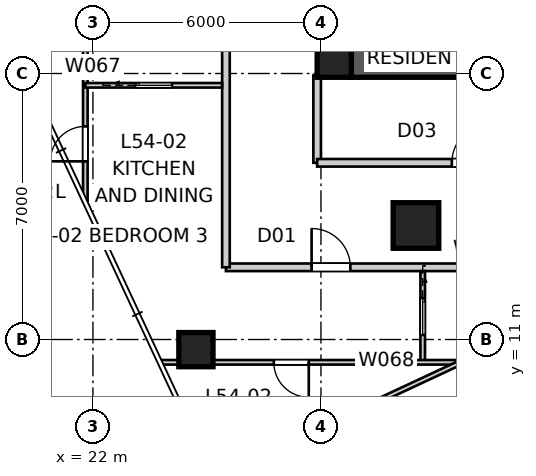
"""IFC4 building model, lengths in metres.
Left out: names, types, materials, properties, quantities, classifications, styles, units other than length and angle.
Written with IfcOpenShell. Run it as: python <this file> out.ifc"""

import sys

from ifc_helpers import new_model, si_unit, direction, frame, frame_2d, origin, origin_2d, place, context, subcontext, project, spatial, polyline, rectangle, outline, extrude, element, fill, save


model = new_model("IFC4")
c1 = context("Model", 3, precision=1e-05, world=origin(), true_north=direction((0.0, 1.0)))
c2 = subcontext(c1, "Body", "Model", "MODEL_VIEW")
j1 = project(units=[si_unit("LENGTHUNIT", "METRE"), si_unit("PLANEANGLEUNIT", "RADIAN")], contexts=[c1])
p1 = place(None, origin())
s1 = spatial("IfcSite", under=j1, at=p1, CompositionType="ELEMENT")
p2 = place(p1, origin())
s2 = spatial("IfcBuilding", under=s1, at=p2, CompositionType="ELEMENT")
p3 = place(p2, frame((0.0, 0.0, 196.4)))
s3 = spatial("IfcBuildingStorey", under=s2, at=p3, CompositionType="ELEMENT", Elevation=196.4)
p4 = place(p3, frame((51.2, 18.35, 0.0), z_axis=(0.0, 0.0, 1.0), x_axis=(-1.0, 0.0, 0.0)))
e1 = element("IfcWall", 1, at=p4, inside=s3, PredefinedType="SHEAR", context=c2, shape_type="SweptSolid", body=[
    extrude(outline(polyline([(0.0, -0.45), (22.4, -0.45), (22.4, -0.025), (22.85, -0.025), (22.85, 0.025), (22.4, 0.025), (22.4, 0.45), (0.0, 0.45), (0.0, 0.025), (-0.45, 0.025), (-0.45, -0.025), (0.0, -0.025), (0.0, -0.45)])), origin(), (0.0, 0.0, 1.0), 3.4),
])
p5 = place(p3, frame((28.35, 41.2, 0.0), z_axis=(0.0, 0.0, 1.0), x_axis=(0.0, -1.0, 0.0)))
e2 = element("IfcWall", 2, at=p5, inside=s3, PredefinedType="SHEAR", context=c2, shape_type="SweptSolid", body=[
    extrude(outline(polyline([(0.0, -0.45), (22.4, -0.45), (22.4, -0.025), (22.85, -0.025), (22.85, 0.025), (22.4, 0.025), (22.4, 0.45), (0.0, 0.45), (0.0, 0.025), (-0.45, 0.025), (-0.45, -0.025), (0.0, -0.025), (0.0, -0.45)])), origin(), (0.0, 0.0, 1.0), 3.4),
])
p6 = place(p5, frame((11.14, 0.0, 0.0)))
e3 = element("IfcOpeningElement", 3, at=p6, cuts=e2, PredefinedType="OPENING", context=c2, shape_type="SweptSolid", body=[
    extrude(rectangle(XDim=1.02, YDim=2.4, at=frame_2d((0.51, 1.2))), frame((0.0, 0.46, 0.0), z_axis=(0.0, -1.0, 0.0), x_axis=(1.0, 0.0, 0.0)), (0.0, 0.0, 1.0), 0.92),
])
for number, where, z_axis, x_axis in (
    (4, (28.35, 18.35, 0.0), (0.0, 0.0, 1.0), (1.0, 0.0, 0.0)),
    (5, (24.71, 10.733, 0.0), (0.0, 0.0, 1.0), (1.0, 0.0, 0.0)),
):
    element("IfcColumn", number, at=place(p3, frame(where, z_axis=z_axis, x_axis=x_axis)), inside=s3, PredefinedType="COLUMN", context=c2, shape_type="SweptSolid", body=[
        extrude(rectangle(XDim=0.9, YDim=0.9, at=origin_2d()), origin(), (0.0, 0.0, 1.0), 3.4),
    ])
p7 = place(p3, frame((30.5, 14.0, 0.0), z_axis=(0.0, 0.0, 1.0), x_axis=(1.0, 0.0, 0.0)))
e6 = element("IfcColumn", 6, at=p7, inside=s3, PredefinedType="COLUMN", context=c2, shape_type="SweptSolid", body=[
    extrude(rectangle(XDim=1.2, YDim=1.2, at=origin_2d()), origin(), (0.0, 0.0, 1.0), 3.4),
])
p8 = place(p3, frame((25.5, 12.9, 0.0), z_axis=(0.0, 0.0, 1.0), x_axis=(1.0, 0.0, 0.0)))
e7 = element("IfcWall", 7, at=p8, inside=s3, PredefinedType="PARTITIONING", context=c2, shape_type="SweptSolid", body=[
    extrude(rectangle(XDim=8.192, YDim=0.2, at=frame_2d((4.096, 0.0))), origin(), (0.0, 0.0, 1.0), 3.25),
])
p9 = place(p8, frame((2.254, 0.0, 0.0)))
e8 = element("IfcOpeningElement", 8, at=p9, cuts=e7, PredefinedType="OPENING", context=c2, shape_type="SweptSolid", body=[
    extrude(rectangle(XDim=1.02, YDim=2.34, at=frame_2d((0.51, 1.17))), frame((0.0, 0.11, 0.0), z_axis=(0.0, -1.0, 0.0), x_axis=(1.0, 0.0, 0.0)), (0.0, 0.0, 1.0), 0.22),
])
p10 = place(p3, frame((25.5, 46.7, 0.0), z_axis=(0.0, 0.0, 1.0), x_axis=(0.0, -1.0, 0.0)))
e9 = element("IfcWall", 9, at=p10, inside=s3, PredefinedType="PARTITIONING", context=c2, shape_type="SweptSolid", body=[
    extrude(rectangle(XDim=33.8, YDim=0.2, at=frame_2d((16.9, 0.0))), origin(), (0.0, 0.0, 1.0), 3.25),
])
p11 = place(p10, frame((15.349, 0.0, 0.0)))
e10 = element("IfcOpeningElement", 10, at=p11, cuts=e9, PredefinedType="OPENING", context=c2, shape_type="SweptSolid", body=[
    extrude(rectangle(XDim=1.02, YDim=2.34, at=frame_2d((0.51, 1.17))), frame((0.0, 0.11, 0.0), z_axis=(0.0, -1.0, 0.0), x_axis=(1.0, 0.0, 0.0)), (0.0, 0.0, 1.0), 0.22),
])
p12 = place(p3, frame((27.9, 17.95, 0.0), z_axis=(0.0, 0.0, 1.0), x_axis=(0.0, -1.0, 0.0)))
e11 = element("IfcWall", 11, at=p12, inside=s3, PredefinedType="PARTITIONING", context=c2, shape_type="SweptSolid", body=[
    extrude(rectangle(XDim=2.3, YDim=0.2, at=frame_2d((1.15, 0.0))), origin(), (0.0, 0.0, 1.0), 3.25),
])
p13 = place(p3, frame((27.9, 15.65, 0.0), z_axis=(0.0, 0.0, 1.0), x_axis=(1.0, 0.0, 0.0)))
e12 = element("IfcWall", 12, at=p13, inside=s3, PredefinedType="PARTITIONING", context=c2, shape_type="SweptSolid", body=[
    extrude(rectangle(XDim=24.2, YDim=0.2, at=frame_2d((12.1, 0.0))), origin(), (0.0, 0.0, 1.0), 3.25),
])
p14 = place(p13, frame((12.437, 0.0, 0.0)))
e13 = element("IfcOpeningElement", 13, at=p14, cuts=e12, PredefinedType="OPENING", context=c2, shape_type="SweptSolid", body=[
    extrude(rectangle(XDim=1.02, YDim=2.1, at=frame_2d((0.51, 1.05))), frame((0.0, 0.11, 0.0), z_axis=(0.0, -1.0, 0.0), x_axis=(1.0, 0.0, 0.0)), (0.0, 0.0, 1.0), 0.22),
])
p15 = place(p13, frame((3.544, 0.0, 0.0)))
e14 = element("IfcOpeningElement", 14, at=p15, cuts=e12, PredefinedType="OPENING", context=c2, shape_type="SweptSolid", body=[
    extrude(rectangle(XDim=1.02, YDim=2.1, at=frame_2d((0.51, 1.05))), frame((0.0, 0.11, 0.0), z_axis=(0.0, -1.0, 0.0), x_axis=(1.0, 0.0, 0.0)), (0.0, 0.0, 1.0), 0.22),
])
p16 = place(p13, frame((19.883, 0.0, 0.0)))
e15 = element("IfcOpeningElement", 15, at=p16, cuts=e12, PredefinedType="OPENING", context=c2, shape_type="SweptSolid", body=[
    extrude(rectangle(XDim=1.02, YDim=2.1, at=frame_2d((0.51, 1.05))), frame((0.0, 0.11, 0.0), z_axis=(0.0, -1.0, 0.0), x_axis=(1.0, 0.0, 0.0)), (0.0, 0.0, 1.0), 0.22),
])
p17 = place(p3, frame((21.8, 14.647, 0.0), z_axis=(0.0, 0.0, 1.0), x_axis=(0.0, 1.0, 0.0)))
e16 = element("IfcWall", 16, at=p17, inside=s3, PredefinedType="PARTITIONING", context=c2, shape_type="SweptSolid", body=[
    extrude(rectangle(XDim=32.199, YDim=0.12, at=frame_2d((16.1, 0.0))), origin(), (0.0, 0.0, 1.0), 3.25),
])
p18 = place(p17, frame((29.231, 0.0, 0.0)))
e17 = element("IfcOpeningElement", 17, at=p18, cuts=e16, PredefinedType="OPENING", context=c2, shape_type="SweptSolid", body=[
    extrude(rectangle(XDim=0.92, YDim=2.34, at=frame_2d((0.46, 1.17))), frame((0.0, 0.07, 0.0), z_axis=(0.0, -1.0, 0.0), x_axis=(1.0, 0.0, 0.0)), (0.0, 0.0, 1.0), 0.14),
])
p19 = place(p17, frame((14.835, 0.0, 0.0)))
e18 = element("IfcOpeningElement", 18, at=p19, cuts=e16, PredefinedType="OPENING", context=c2, shape_type="SweptSolid", body=[
    extrude(rectangle(XDim=0.92, YDim=2.34, at=frame_2d((0.46, 1.17))), frame((0.0, 0.07, 0.0), z_axis=(0.0, -1.0, 0.0), x_axis=(1.0, 0.0, 0.0)), (0.0, 0.0, 1.0), 0.14),
])
p20 = place(p17, frame((1.041, 0.0, 0.0)))
e19 = element("IfcOpeningElement", 19, at=p20, cuts=e16, PredefinedType="OPENING", context=c2, shape_type="SweptSolid", body=[
    extrude(rectangle(XDim=0.92, YDim=2.1, at=frame_2d((0.46, 1.05))), frame((0.0, 0.07, 0.0), z_axis=(0.0, -1.0, 0.0), x_axis=(1.0, 0.0, 0.0)), (0.0, 0.0, 1.0), 0.14),
])
p21 = place(p17, frame((19.971, 0.0, 0.0)))
e20 = element("IfcOpeningElement", 20, at=p21, cuts=e16, PredefinedType="OPENING", context=c2, shape_type="SweptSolid", body=[
    extrude(rectangle(XDim=0.96, YDim=2.1, at=frame_2d((0.48, 1.05))), frame((0.0, 0.07, 0.0), z_axis=(0.0, -1.0, 0.0), x_axis=(1.0, 0.0, 0.0)), (0.0, 0.0, 1.0), 0.14),
])
p22 = place(p3, frame((21.8, 17.69, 0.0), z_axis=(0.0, 0.0, 1.0), x_axis=(1.0, 0.0, 0.0)))
e21 = element("IfcWall", 21, at=p22, inside=s3, PredefinedType="PARTITIONING", context=c2, shape_type="SweptSolid", body=[
    extrude(rectangle(XDim=3.6, YDim=0.12, at=frame_2d((1.8, 0.0))), origin(), (0.0, 0.0, 1.0), 3.25),
])
p23 = place(p22, frame((1.32, 0.0, 0.0)))
e22 = element("IfcOpeningElement", 22, at=p23, cuts=e21, PredefinedType="OPENING", context=c2, shape_type="SweptSolid", body=[
    extrude(rectangle(XDim=0.96, YDim=2.1, at=frame_2d((0.48, 1.05))), frame((0.0, 0.07, 0.0), z_axis=(0.0, -1.0, 0.0), x_axis=(1.0, 0.0, 0.0)), (0.0, 0.0, 1.0), 0.14),
])
p24 = place(p3, frame((30.677, 12.8, 0.0), z_axis=(0.0, 0.0, 1.0), x_axis=(0.0, -1.0, 0.0)))
e23 = element("IfcWall", 23, at=p24, inside=s3, PredefinedType="PARTITIONING", context=c2, shape_type="SweptSolid", body=[
    extrude(rectangle(XDim=2.4, YDim=0.12, at=frame_2d((1.2, 0.0))), origin(), (0.0, 0.0, 1.0), 3.25),
])
p25 = place(p24, frame((0.72, 0.0, 0.0)))
e24 = element("IfcOpeningElement", 24, at=p25, cuts=e23, PredefinedType="OPENING", context=c2, shape_type="SweptSolid", body=[
    extrude(rectangle(XDim=0.96, YDim=2.1, at=frame_2d((0.48, 1.05))), frame((0.0, 0.07, 0.0), z_axis=(0.0, -1.0, 0.0), x_axis=(1.0, 0.0, 0.0)), (0.0, 0.0, 1.0), 0.14),
])
p26 = place(p3, frame((49.14, 10.4, 0.0), z_axis=(0.0, 0.0, 1.0), x_axis=(-1.0, 0.0, 0.0)))
e25 = element("IfcWall", 25, at=p26, inside=s3, PredefinedType="PARTITIONING", context=c2, shape_type="SweptSolid", body=[
    extrude(rectangle(XDim=25.333, YDim=0.12, at=frame_2d((12.667, 0.0))), origin(), (0.0, 0.0, 1.0), 3.25),
])
p27 = place(p26, frame((2.188, 0.0, 0.0)))
e26 = element("IfcOpeningElement", 26, at=p27, cuts=e25, PredefinedType="OPENING", context=c2, shape_type="SweptSolid", body=[
    extrude(rectangle(XDim=0.92, YDim=2.34, at=frame_2d((0.46, 1.17))), frame((0.0, 0.07, 0.0), z_axis=(0.0, -1.0, 0.0), x_axis=(1.0, 0.0, 0.0)), (0.0, 0.0, 1.0), 0.14),
])
p28 = place(p26, frame((21.46, 0.0, 0.0)))
e27 = element("IfcOpeningElement", 27, at=p28, cuts=e25, PredefinedType="OPENING", context=c2, shape_type="SweptSolid", body=[
    extrude(rectangle(XDim=0.92, YDim=2.34, at=frame_2d((0.46, 1.17))), frame((0.0, 0.07, 0.0), z_axis=(0.0, -1.0, 0.0), x_axis=(1.0, 0.0, 0.0)), (0.0, 0.0, 1.0), 0.14),
])
p29 = place(p26, frame((8.035, 0.0, 0.0)))
e28 = element("IfcOpeningElement", 28, at=p29, cuts=e25, PredefinedType="OPENING", context=c2, shape_type="SweptSolid", body=[
    extrude(rectangle(XDim=0.96, YDim=2.1, at=frame_2d((0.48, 1.05))), frame((0.0, 0.07, 0.0), z_axis=(0.0, -1.0, 0.0), x_axis=(1.0, 0.0, 0.0)), (0.0, 0.0, 1.0), 0.14),
])
p30 = place(p26, frame((16.14, 0.0, 0.0)))
e29 = element("IfcOpeningElement", 29, at=p30, cuts=e25, PredefinedType="OPENING", context=c2, shape_type="SweptSolid", body=[
    extrude(rectangle(XDim=0.96, YDim=2.1, at=frame_2d((0.48, 1.05))), frame((0.0, 0.07, 0.0), z_axis=(0.0, -1.0, 0.0), x_axis=(1.0, 0.0, 0.0)), (0.0, 0.0, 1.0), 0.14),
])
p31 = place(p26, frame((12.283, 0.0, 0.0)))
e30 = element("IfcOpeningElement", 30, at=p31, cuts=e25, PredefinedType="OPENING", context=c2, shape_type="SweptSolid", body=[
    extrude(rectangle(XDim=0.96, YDim=2.1, at=frame_2d((0.48, 1.05))), frame((0.0, 0.07, 0.0), z_axis=(0.0, -1.0, 0.0), x_axis=(1.0, 0.0, 0.0)), (0.0, 0.0, 1.0), 0.14),
])
p32 = place(p3, frame((25.213, 7.382, 0.0), z_axis=(0.0, 0.0, 1.0), x_axis=(0.906317589158, 0.422597240388, 0.0)))
e31 = element("IfcWall", 31, at=p32, inside=s3, PredefinedType="PARTITIONING", context=c2, shape_type="SweptSolid", body=[
    extrude(rectangle(XDim=7.142, YDim=0.12, at=frame_2d((3.571, 0.0))), origin(), (0.0, 0.0, 1.0), 3.25),
])
p33 = place(p15, origin())
e32 = element("IfcDoor", 32, at=p33, inside=s3, OperationType="SINGLE_SWING_RIGHT", PredefinedType="DOOR", context=c2, shape_type="SweptSolid", body=[
    extrude(rectangle(XDim=1.02, YDim=2.1, at=frame_2d((0.51, 1.05))), frame((0.0, 0.025, 0.0), z_axis=(0.0, -1.0, 0.0), x_axis=(1.0, 0.0, 0.0)), (0.0, 0.0, 1.0), 0.05),
])
fill(e14, e32)
p34 = place(p9, origin())
e33 = element("IfcDoor", 33, at=p34, inside=s3, OperationType="SINGLE_SWING_LEFT", PredefinedType="DOOR", context=c2, shape_type="SweptSolid", body=[
    extrude(rectangle(XDim=1.02, YDim=2.34, at=frame_2d((0.51, 1.17))), frame((0.0, 0.025, 0.0), z_axis=(0.0, -1.0, 0.0), x_axis=(1.0, 0.0, 0.0)), (0.0, 0.0, 1.0), 0.05),
])
fill(e8, e33)
p35 = place(p28, origin())
e34 = element("IfcDoor", 34, at=p35, inside=s3, OperationType="SINGLE_SWING_LEFT", PredefinedType="DOOR", context=c2, shape_type="SweptSolid", body=[
    extrude(rectangle(XDim=0.92, YDim=2.34, at=frame_2d((0.46, 1.17))), frame((0.0, 0.025, 0.0), z_axis=(0.0, -1.0, 0.0), x_axis=(1.0, 0.0, 0.0)), (0.0, 0.0, 1.0), 0.05),
])
fill(e27, e34)
p36 = place(p23, origin())
e35 = element("IfcDoor", 35, at=p36, inside=s3, OperationType="SLIDING_TO_LEFT", PredefinedType="DOOR", context=c2, shape_type="SweptSolid", body=[
    extrude(rectangle(XDim=0.96, YDim=2.1, at=frame_2d((0.48, 1.05))), frame((0.0, 0.025, 0.0), z_axis=(0.0, -1.0, 0.0), x_axis=(1.0, 0.0, 0.0)), (0.0, 0.0, 1.0), 0.05),
])
fill(e22, e35)
p37 = place(p20, origin())
e36 = element("IfcDoor", 36, at=p37, inside=s3, OperationType="SINGLE_SWING_LEFT", PredefinedType="DOOR", context=c2, shape_type="SweptSolid", body=[
    extrude(rectangle(XDim=0.92, YDim=2.1, at=frame_2d((0.46, 1.05))), frame((0.0, 0.025, 0.0), z_axis=(0.0, -1.0, 0.0), x_axis=(1.0, 0.0, 0.0)), (0.0, 0.0, 1.0), 0.05),
])
fill(e19, e36)
p38 = place(p25, origin())
e37 = element("IfcDoor", 37, at=p38, inside=s3, OperationType="SLIDING_TO_LEFT", PredefinedType="DOOR", context=c2, shape_type="SweptSolid", body=[
    extrude(rectangle(XDim=0.96, YDim=2.1, at=frame_2d((0.48, 1.05))), frame((0.0, 0.025, 0.0), z_axis=(0.0, -1.0, 0.0), x_axis=(1.0, 0.0, 0.0)), (0.0, 0.0, 1.0), 0.05),
])
fill(e24, e37)
save(model, sys.argv[1])
